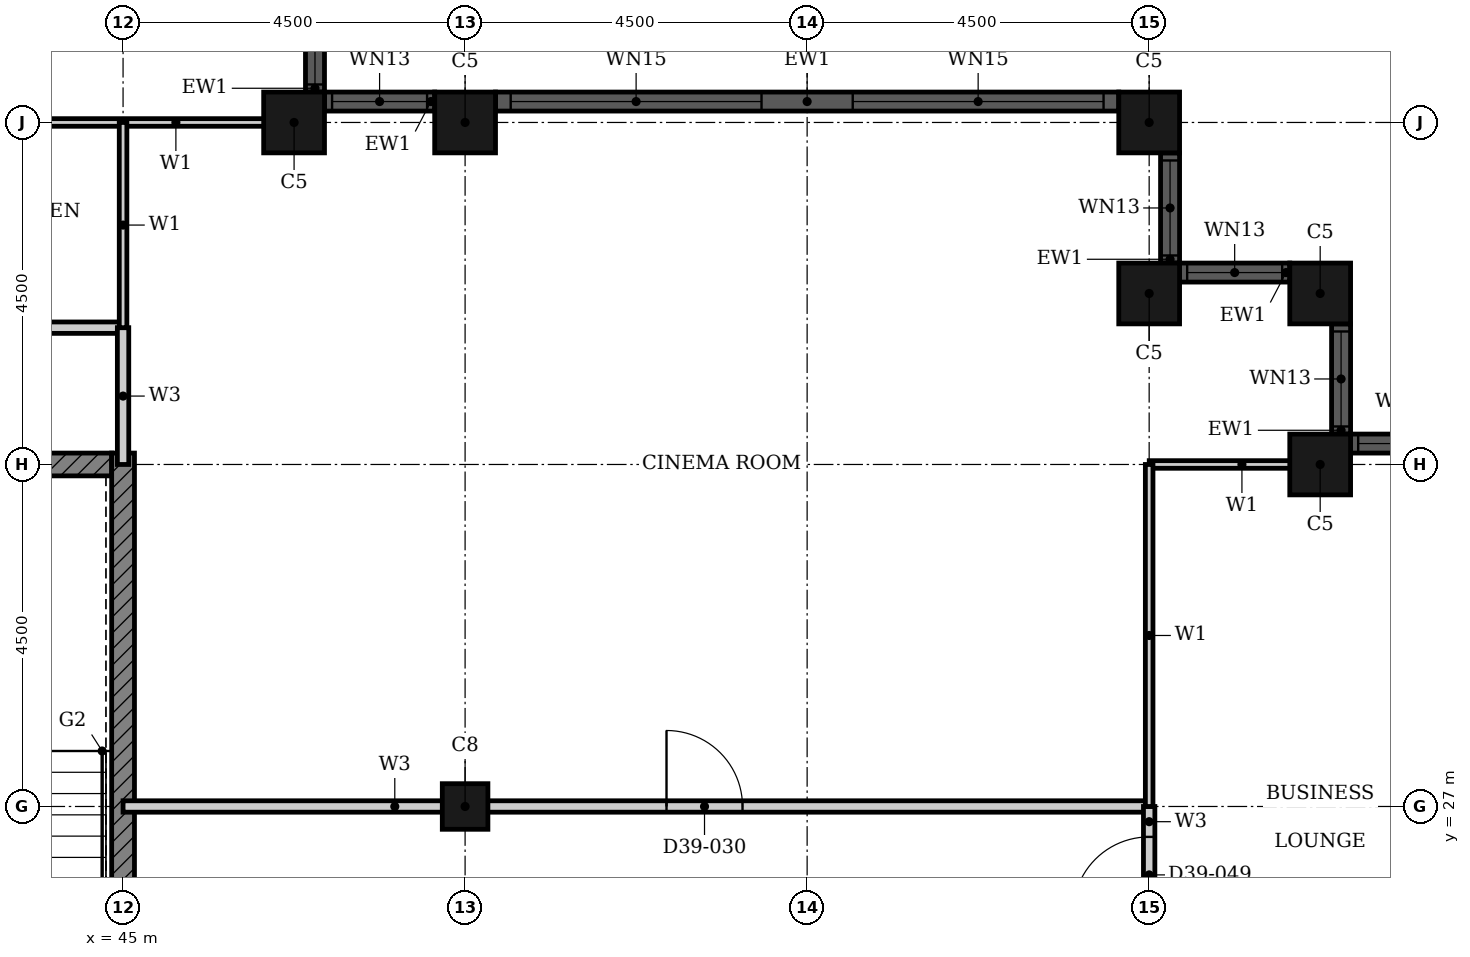
"""IFC4 building model, lengths in metres.
Left out: names, types, materials, properties, quantities, classifications, styles, units other than length and angle.
Written with IfcOpenShell. Run it as: python <this file> out.ifc"""

import sys

from ifc_helpers import new_model, si_unit, direction, frame, frame_2d, origin, origin_2d, place, context, subcontext, project, spatial, rectangle, hollow_rectangle, extrude, element, fill, save


model = new_model("IFC4")
c1 = context("Model", 3, precision=1e-05, world=origin(), true_north=direction((0.0, 1.0)))
c2 = subcontext(c1, "Body", "Model", "MODEL_VIEW")
j1 = project(units=[si_unit("LENGTHUNIT", "METRE"), si_unit("PLANEANGLEUNIT", "RADIAN")], contexts=[c1])
p1 = place(None, origin())
s1 = spatial("IfcSite", under=j1, at=p1, CompositionType="ELEMENT")
p2 = place(p1, origin())
s2 = spatial("IfcBuilding", under=s1, at=p2, CompositionType="ELEMENT")
p3 = place(p2, frame((0.0, 0.0, 158.0)))
s3 = spatial("IfcBuildingStorey", under=s2, at=p3, CompositionType="ELEMENT", Elevation=158.0)
for number, where, z_axis, x_axis in (
    (1, (60.75, 31.5, 0.0), (0.0, 0.0, 1.0), (1.0, 0.0, 0.0)),
    (2, (60.75, 33.75, 0.0), (0.0, 0.0, 1.0), (1.0, 0.0, 0.0)),
    (3, (58.5, 33.75, 0.0), (0.0, 0.0, 1.0), (1.0, 0.0, 0.0)),
    (4, (58.5, 36.0, 0.0), (0.0, 0.0, 1.0), (1.0, 0.0, 0.0)),
    (5, (49.5, 36.0, 0.0), (0.0, 0.0, 1.0), (1.0, 0.0, 0.0)),
    (6, (47.25, 36.0, 0.0), (0.0, 0.0, 1.0), (1.0, 0.0, 0.0)),
):
    element("IfcColumn", number, at=place(p3, frame(where, z_axis=z_axis, x_axis=x_axis)), inside=s3, PredefinedType="COLUMN", context=c2, shape_type="SweptSolid", body=[
        extrude(hollow_rectangle(XDim=0.8, YDim=0.8, WallThickness=0.025, at=origin_2d()), origin(), (0.0, 0.0, 1.0), 3.7),
    ])
p4 = place(p3, frame((49.5, 27.0, 0.0), z_axis=(0.0, 0.0, 1.0), x_axis=(1.0, 0.0, 0.0)))
e7 = element("IfcColumn", 7, at=p4, inside=s3, PredefinedType="COLUMN", context=c2, shape_type="SweptSolid", body=[
    extrude(hollow_rectangle(XDim=0.6, YDim=0.6, WallThickness=0.02, at=origin_2d()), origin(), (0.0, 0.0, 1.0), 3.7),
])
p5 = place(p3, frame((62.6, 31.775, 0.0), z_axis=(0.0, 0.0, 1.0), x_axis=(-1.0, 0.0, 0.0)))
e8 = element("IfcWall", 8, at=p5, inside=s3, PredefinedType="SOLIDWALL", context=c2, shape_type="SweptSolid", body=[
    extrude(rectangle(XDim=1.45, YDim=0.25, at=frame_2d((0.725, 0.0))), origin(), (0.0, 0.0, 1.0), 3.7),
])
p6 = place(p5, frame((0.1, 0.0, 0.9)))
e9 = element("IfcOpeningElement", 9, at=p6, cuts=e8, PredefinedType="OPENING", context=c2, shape_type="SweptSolid", body=[
    extrude(rectangle(XDim=1.25, YDim=1.85, at=frame_2d((0.625, 0.925))), frame((0.0, 0.135, 0.0), z_axis=(0.0, -1.0, 0.0), x_axis=(1.0, 0.0, 0.0)), (0.0, 0.0, 1.0), 0.27),
])
p7 = place(p3, frame((61.025, 31.9, 0.0), z_axis=(0.0, 0.0, 1.0), x_axis=(0.0, 1.0, 0.0)))
e10 = element("IfcWall", 10, at=p7, inside=s3, PredefinedType="SOLIDWALL", context=c2, shape_type="SweptSolid", body=[
    extrude(rectangle(XDim=1.45, YDim=0.25, at=frame_2d((0.725, 0.0))), origin(), (0.0, 0.0, 1.0), 3.7),
])
p8 = place(p7, frame((0.1, 0.0, 0.9)))
e11 = element("IfcOpeningElement", 11, at=p8, cuts=e10, PredefinedType="OPENING", context=c2, shape_type="SweptSolid", body=[
    extrude(rectangle(XDim=1.25, YDim=1.85, at=frame_2d((0.625, 0.925))), frame((0.0, 0.135, 0.0), z_axis=(0.0, -1.0, 0.0), x_axis=(1.0, 0.0, 0.0)), (0.0, 0.0, 1.0), 0.27),
])
p9 = place(p3, frame((60.35, 34.025, 0.0), z_axis=(0.0, 0.0, 1.0), x_axis=(-1.0, 0.0, 0.0)))
e12 = element("IfcWall", 12, at=p9, inside=s3, PredefinedType="SOLIDWALL", context=c2, shape_type="SweptSolid", body=[
    extrude(rectangle(XDim=1.45, YDim=0.25, at=frame_2d((0.725, 0.0))), origin(), (0.0, 0.0, 1.0), 3.7),
])
p10 = place(p9, frame((0.1, 0.0, 0.9)))
e13 = element("IfcOpeningElement", 13, at=p10, cuts=e12, PredefinedType="OPENING", context=c2, shape_type="SweptSolid", body=[
    extrude(rectangle(XDim=1.25, YDim=1.85, at=frame_2d((0.625, 0.925))), frame((0.0, 0.135, 0.0), z_axis=(0.0, -1.0, 0.0), x_axis=(1.0, 0.0, 0.0)), (0.0, 0.0, 1.0), 0.27),
])
p11 = place(p3, frame((58.775, 34.15, 0.0), z_axis=(0.0, 0.0, 1.0), x_axis=(0.0, 1.0, 0.0)))
e14 = element("IfcWall", 14, at=p11, inside=s3, PredefinedType="SOLIDWALL", context=c2, shape_type="SweptSolid", body=[
    extrude(rectangle(XDim=1.45, YDim=0.25, at=frame_2d((0.725, 0.0))), origin(), (0.0, 0.0, 1.0), 3.7),
])
p12 = place(p11, frame((0.1, 0.0, 0.9)))
e15 = element("IfcOpeningElement", 15, at=p12, cuts=e14, PredefinedType="OPENING", context=c2, shape_type="SweptSolid", body=[
    extrude(rectangle(XDim=1.25, YDim=1.85, at=frame_2d((0.625, 0.925))), frame((0.0, 0.135, 0.0), z_axis=(0.0, -1.0, 0.0), x_axis=(1.0, 0.0, 0.0)), (0.0, 0.0, 1.0), 0.27),
])
p13 = place(p3, frame((58.1, 36.275, 0.0), z_axis=(0.0, 0.0, 1.0), x_axis=(-1.0, 0.0, 0.0)))
e16 = element("IfcWall", 16, at=p13, inside=s3, PredefinedType="SOLIDWALL", context=c2, shape_type="SweptSolid", body=[
    extrude(rectangle(XDim=8.2, YDim=0.25, at=frame_2d((4.1, 0.0))), origin(), (0.0, 0.0, 1.0), 3.7),
])
p14 = place(p13, frame((0.2, 0.0, 0.45)))
e17 = element("IfcOpeningElement", 17, at=p14, cuts=e16, PredefinedType="OPENING", context=c2, shape_type="SweptSolid", body=[
    extrude(rectangle(XDim=3.3, YDim=2.3, at=frame_2d((1.65, 1.15))), frame((0.0, 0.135, 0.0), z_axis=(0.0, -1.0, 0.0), x_axis=(1.0, 0.0, 0.0)), (0.0, 0.0, 1.0), 0.27),
])
p15 = place(p13, frame((4.7, 0.0, 0.45)))
e18 = element("IfcOpeningElement", 18, at=p15, cuts=e16, PredefinedType="OPENING", context=c2, shape_type="SweptSolid", body=[
    extrude(rectangle(XDim=3.3, YDim=2.3, at=frame_2d((1.65, 1.15))), frame((0.0, 0.135, 0.0), z_axis=(0.0, -1.0, 0.0), x_axis=(1.0, 0.0, 0.0)), (0.0, 0.0, 1.0), 0.27),
])
p16 = place(p3, frame((49.1, 36.275, 0.0), z_axis=(0.0, 0.0, 1.0), x_axis=(-1.0, 0.0, 0.0)))
e19 = element("IfcWall", 19, at=p16, inside=s3, PredefinedType="SOLIDWALL", context=c2, shape_type="SweptSolid", body=[
    extrude(rectangle(XDim=1.45, YDim=0.25, at=frame_2d((0.725, 0.0))), origin(), (0.0, 0.0, 1.0), 3.7),
])
p17 = place(p16, frame((0.1, 0.0, 0.9)))
e20 = element("IfcOpeningElement", 20, at=p17, cuts=e19, PredefinedType="OPENING", context=c2, shape_type="SweptSolid", body=[
    extrude(rectangle(XDim=1.25, YDim=1.85, at=frame_2d((0.625, 0.925))), frame((0.0, 0.135, 0.0), z_axis=(0.0, -1.0, 0.0), x_axis=(1.0, 0.0, 0.0)), (0.0, 0.0, 1.0), 0.27),
])
p18 = place(p3, frame((47.525, 36.4, 0.0), z_axis=(0.0, 0.0, 1.0), x_axis=(0.0, 1.0, 0.0)))
e21 = element("IfcWall", 21, at=p18, inside=s3, PredefinedType="SOLIDWALL", context=c2, shape_type="SweptSolid", body=[
    extrude(rectangle(XDim=1.45, YDim=0.25, at=frame_2d((0.725, 0.0))), origin(), (0.0, 0.0, 1.0), 3.7),
])
p19 = place(p18, frame((0.1, 0.0, 0.9)))
e22 = element("IfcOpeningElement", 22, at=p19, cuts=e21, PredefinedType="OPENING", context=c2, shape_type="SweptSolid", body=[
    extrude(rectangle(XDim=1.25, YDim=1.85, at=frame_2d((0.625, 0.925))), frame((0.0, 0.135, 0.0), z_axis=(0.0, -1.0, 0.0), x_axis=(1.0, 0.0, 0.0)), (0.0, 0.0, 1.0), 0.27),
])
p20 = place(p3, frame((40.625, 31.5, 0.0), z_axis=(0.0, 0.0, 1.0), x_axis=(1.0, 0.0, 0.0)))
e23 = element("IfcWall", 23, at=p20, inside=s3, PredefinedType="SHEAR", context=c2, shape_type="SweptSolid", body=[
    extrude(rectangle(XDim=4.225, YDim=0.3, at=frame_2d((2.113, 0.0))), origin(), (0.0, 0.0, 1.0), 3.4),
])
p21 = place(p3, frame((45.0, 22.35, 0.0), z_axis=(0.0, 0.0, 1.0), x_axis=(0.0, 1.0, 0.0)))
e24 = element("IfcWall", 24, at=p21, inside=s3, PredefinedType="SHEAR", context=c2, shape_type="SweptSolid", body=[
    extrude(rectangle(XDim=9.3, YDim=0.3, at=frame_2d((4.65, 0.0))), origin(), (0.0, 0.0, 1.0), 3.4),
])
p22 = place(p3, frame((45.0, 27.0, 0.0), z_axis=(0.0, 0.0, 1.0), x_axis=(1.0, 0.0, 0.0)))
e25 = element("IfcWall", 25, at=p22, inside=s3, PredefinedType="PARTITIONING", context=c2, shape_type="SweptSolid", body=[
    extrude(rectangle(XDim=13.5, YDim=0.15, at=frame_2d((6.75, 0.0))), origin(), (0.0, 0.0, 1.0), 2.68),
])
p23 = place(p22, frame((7.15, 0.0, 0.0)))
e26 = element("IfcOpeningElement", 26, at=p23, cuts=e25, PredefinedType="OPENING", context=c2, shape_type="SweptSolid", body=[
    extrude(rectangle(XDim=1.0, YDim=2.1, at=frame_2d((0.5, 1.05))), frame((0.0, 0.085, 0.0), z_axis=(0.0, -1.0, 0.0), x_axis=(1.0, 0.0, 0.0)), (0.0, 0.0, 1.0), 0.17),
])
p24 = place(p3, frame((38.4, 33.3, 0.0), z_axis=(0.0, 0.0, 1.0), x_axis=(1.0, 0.0, 0.0)))
e27 = element("IfcWall", 27, at=p24, inside=s3, PredefinedType="PARTITIONING", context=c2, shape_type="SweptSolid", body=[
    extrude(rectangle(XDim=6.6, YDim=0.15, at=frame_2d((3.3, 0.0))), origin(), (0.0, 0.0, 1.0), 3.4),
])
p25 = place(p24, frame((1.3, 0.0, 0.0)))
e28 = element("IfcOpeningElement", 28, at=p25, cuts=e27, PredefinedType="OPENING", context=c2, shape_type="SweptSolid", body=[
    extrude(rectangle(XDim=1.0, YDim=2.2, at=frame_2d((0.5, 1.1))), frame((0.0, 0.085, 0.0), z_axis=(0.0, -1.0, 0.0), x_axis=(1.0, 0.0, 0.0)), (0.0, 0.0, 1.0), 0.17),
])
p26 = place(p3, frame((45.0, 31.5, 0.0), z_axis=(0.0, 0.0, 1.0), x_axis=(0.0, 1.0, 0.0)))
e29 = element("IfcWall", 29, at=p26, inside=s3, PredefinedType="PARTITIONING", context=c2, shape_type="SweptSolid", body=[
    extrude(rectangle(XDim=1.8, YDim=0.15, at=frame_2d((0.9, 0.0))), origin(), (0.0, 0.0, 1.0), 3.4),
])
p27 = place(p3, frame((58.5, 25.2, 0.0), z_axis=(0.0, 0.0, 1.0), x_axis=(0.0, 1.0, 0.0)))
e30 = element("IfcWall", 30, at=p27, inside=s3, PredefinedType="PARTITIONING", context=c2, shape_type="SweptSolid", body=[
    extrude(rectangle(XDim=1.8, YDim=0.15, at=frame_2d((0.9, 0.0))), origin(), (0.0, 0.0, 1.0), 3.4),
])
p28 = place(p27, frame((0.4, 0.0, 0.0)))
e31 = element("IfcOpeningElement", 31, at=p28, cuts=e30, PredefinedType="OPENING", context=c2, shape_type="SweptSolid", body=[
    extrude(rectangle(XDim=1.0, YDim=2.1, at=frame_2d((0.5, 1.05))), frame((0.0, 0.085, 0.0), z_axis=(0.0, -1.0, 0.0), x_axis=(1.0, 0.0, 0.0)), (0.0, 0.0, 1.0), 0.17),
])
p29 = place(p3, frame((58.501, 31.5, 0.0), z_axis=(0.0, 0.0, 1.0), x_axis=(1.0, 0.0, 0.0)))
e32 = element("IfcWall", 32, at=p29, inside=s3, PredefinedType="PARTITIONING", context=c2, shape_type="SweptSolid", body=[
    extrude(rectangle(XDim=2.439, YDim=0.1, at=frame_2d((1.219, 0.0))), origin(), (0.0, 0.0, 1.0), 2.68),
])
p30 = place(p3, frame((42.0, 36.0, 0.0), z_axis=(0.0, 0.0, 1.0), x_axis=(1.0, 0.0, 0.0)))
e33 = element("IfcWall", 33, at=p30, inside=s3, PredefinedType="PARTITIONING", context=c2, shape_type="SweptSolid", body=[
    extrude(rectangle(XDim=5.44, YDim=0.1, at=frame_2d((2.72, 0.0))), origin(), (0.0, 0.0, 1.0), 3.4),
])
p31 = place(p30, frame((1.05, 0.0, 0.0)))
e34 = element("IfcOpeningElement", 34, at=p31, cuts=e33, PredefinedType="OPENING", context=c2, shape_type="SweptSolid", body=[
    extrude(rectangle(XDim=0.9, YDim=2.1, at=frame_2d((0.45, 1.05))), frame((0.0, 0.06, 0.0), z_axis=(0.0, -1.0, 0.0), x_axis=(1.0, 0.0, 0.0)), (0.0, 0.0, 1.0), 0.12),
])
p32 = place(p3, frame((45.0, 33.3, 0.0), z_axis=(0.0, 0.0, 1.0), x_axis=(0.0, 1.0, 0.0)))
e35 = element("IfcWall", 35, at=p32, inside=s3, PredefinedType="PARTITIONING", context=c2, shape_type="SweptSolid", body=[
    extrude(rectangle(XDim=2.7, YDim=0.1, at=frame_2d((1.35, 0.0))), origin(), (0.0, 0.0, 1.0), 3.4),
])
p33 = place(p3, frame((58.5, 27.0, 0.0), z_axis=(0.0, 0.0, 1.0), x_axis=(0.0, 1.0, 0.0)))
e36 = element("IfcWall", 36, at=p33, inside=s3, PredefinedType="PARTITIONING", context=c2, shape_type="SweptSolid", body=[
    extrude(rectangle(XDim=4.5, YDim=0.1, at=frame_2d((2.25, 0.0))), origin(), (0.0, 0.0, 1.0), 3.4),
])
p34 = place(p6, origin())
e37 = element("IfcWindow", 37, at=p34, inside=s3, PartitioningType="SINGLE_PANEL", PredefinedType="WINDOW", context=c2, shape_type="SweptSolid", body=[
    extrude(rectangle(XDim=1.25, YDim=1.85, at=frame_2d((0.625, 0.925))), frame((0.0, 0.03, 0.0), z_axis=(0.0, -1.0, 0.0), x_axis=(1.0, 0.0, 0.0)), (0.0, 0.0, 1.0), 0.06),
])
fill(e9, e37)
p35 = place(p8, origin())
e38 = element("IfcWindow", 38, at=p35, inside=s3, PartitioningType="SINGLE_PANEL", PredefinedType="WINDOW", context=c2, shape_type="SweptSolid", body=[
    extrude(rectangle(XDim=1.25, YDim=1.85, at=frame_2d((0.625, 0.925))), frame((0.0, 0.03, 0.0), z_axis=(0.0, -1.0, 0.0), x_axis=(1.0, 0.0, 0.0)), (0.0, 0.0, 1.0), 0.06),
])
fill(e11, e38)
p36 = place(p10, origin())
e39 = element("IfcWindow", 39, at=p36, inside=s3, PartitioningType="SINGLE_PANEL", PredefinedType="WINDOW", context=c2, shape_type="SweptSolid", body=[
    extrude(rectangle(XDim=1.25, YDim=1.85, at=frame_2d((0.625, 0.925))), frame((0.0, 0.03, 0.0), z_axis=(0.0, -1.0, 0.0), x_axis=(1.0, 0.0, 0.0)), (0.0, 0.0, 1.0), 0.06),
])
fill(e13, e39)
p37 = place(p12, origin())
e40 = element("IfcWindow", 40, at=p37, inside=s3, PartitioningType="SINGLE_PANEL", PredefinedType="WINDOW", context=c2, shape_type="SweptSolid", body=[
    extrude(rectangle(XDim=1.25, YDim=1.85, at=frame_2d((0.625, 0.925))), frame((0.0, 0.03, 0.0), z_axis=(0.0, -1.0, 0.0), x_axis=(1.0, 0.0, 0.0)), (0.0, 0.0, 1.0), 0.06),
])
fill(e15, e40)
p38 = place(p14, origin())
e41 = element("IfcWindow", 41, at=p38, inside=s3, PartitioningType="SINGLE_PANEL", PredefinedType="WINDOW", context=c2, shape_type="SweptSolid", body=[
    extrude(rectangle(XDim=3.3, YDim=2.3, at=frame_2d((1.65, 1.15))), frame((0.0, 0.03, 0.0), z_axis=(0.0, -1.0, 0.0), x_axis=(1.0, 0.0, 0.0)), (0.0, 0.0, 1.0), 0.06),
])
fill(e17, e41)
p39 = place(p15, origin())
e42 = element("IfcWindow", 42, at=p39, inside=s3, PartitioningType="SINGLE_PANEL", PredefinedType="WINDOW", context=c2, shape_type="SweptSolid", body=[
    extrude(rectangle(XDim=3.3, YDim=2.3, at=frame_2d((1.65, 1.15))), frame((0.0, 0.03, 0.0), z_axis=(0.0, -1.0, 0.0), x_axis=(1.0, 0.0, 0.0)), (0.0, 0.0, 1.0), 0.06),
])
fill(e18, e42)
p40 = place(p17, origin())
e43 = element("IfcWindow", 43, at=p40, inside=s3, PartitioningType="SINGLE_PANEL", PredefinedType="WINDOW", context=c2, shape_type="SweptSolid", body=[
    extrude(rectangle(XDim=1.25, YDim=1.85, at=frame_2d((0.625, 0.925))), frame((0.0, 0.03, 0.0), z_axis=(0.0, -1.0, 0.0), x_axis=(1.0, 0.0, 0.0)), (0.0, 0.0, 1.0), 0.06),
])
fill(e20, e43)
p41 = place(p19, origin())
e44 = element("IfcWindow", 44, at=p41, inside=s3, PartitioningType="SINGLE_PANEL", PredefinedType="WINDOW", context=c2, shape_type="SweptSolid", body=[
    extrude(rectangle(XDim=1.25, YDim=1.85, at=frame_2d((0.625, 0.925))), frame((0.0, 0.03, 0.0), z_axis=(0.0, -1.0, 0.0), x_axis=(1.0, 0.0, 0.0)), (0.0, 0.0, 1.0), 0.06),
])
fill(e22, e44)
p42 = place(p23, origin())
e45 = element("IfcDoor", 45, at=p42, inside=s3, OperationType="SINGLE_SWING_RIGHT", PredefinedType="DOOR", context=c2, shape_type="SweptSolid", body=[
    extrude(rectangle(XDim=1.0, YDim=2.1, at=frame_2d((0.5, 1.05))), frame((0.0, 0.025, 0.0), z_axis=(0.0, -1.0, 0.0), x_axis=(1.0, 0.0, 0.0)), (0.0, 0.0, 1.0), 0.05),
])
fill(e26, e45)
p43 = place(p28, origin())
e46 = element("IfcDoor", 46, at=p43, inside=s3, OperationType="SINGLE_SWING_LEFT", PredefinedType="DOOR", context=c2, shape_type="SweptSolid", body=[
    extrude(rectangle(XDim=1.0, YDim=2.1, at=frame_2d((0.5, 1.05))), frame((0.0, 0.025, 0.0), z_axis=(0.0, -1.0, 0.0), x_axis=(1.0, 0.0, 0.0)), (0.0, 0.0, 1.0), 0.05),
])
fill(e31, e46)
save(model, sys.argv[1])
